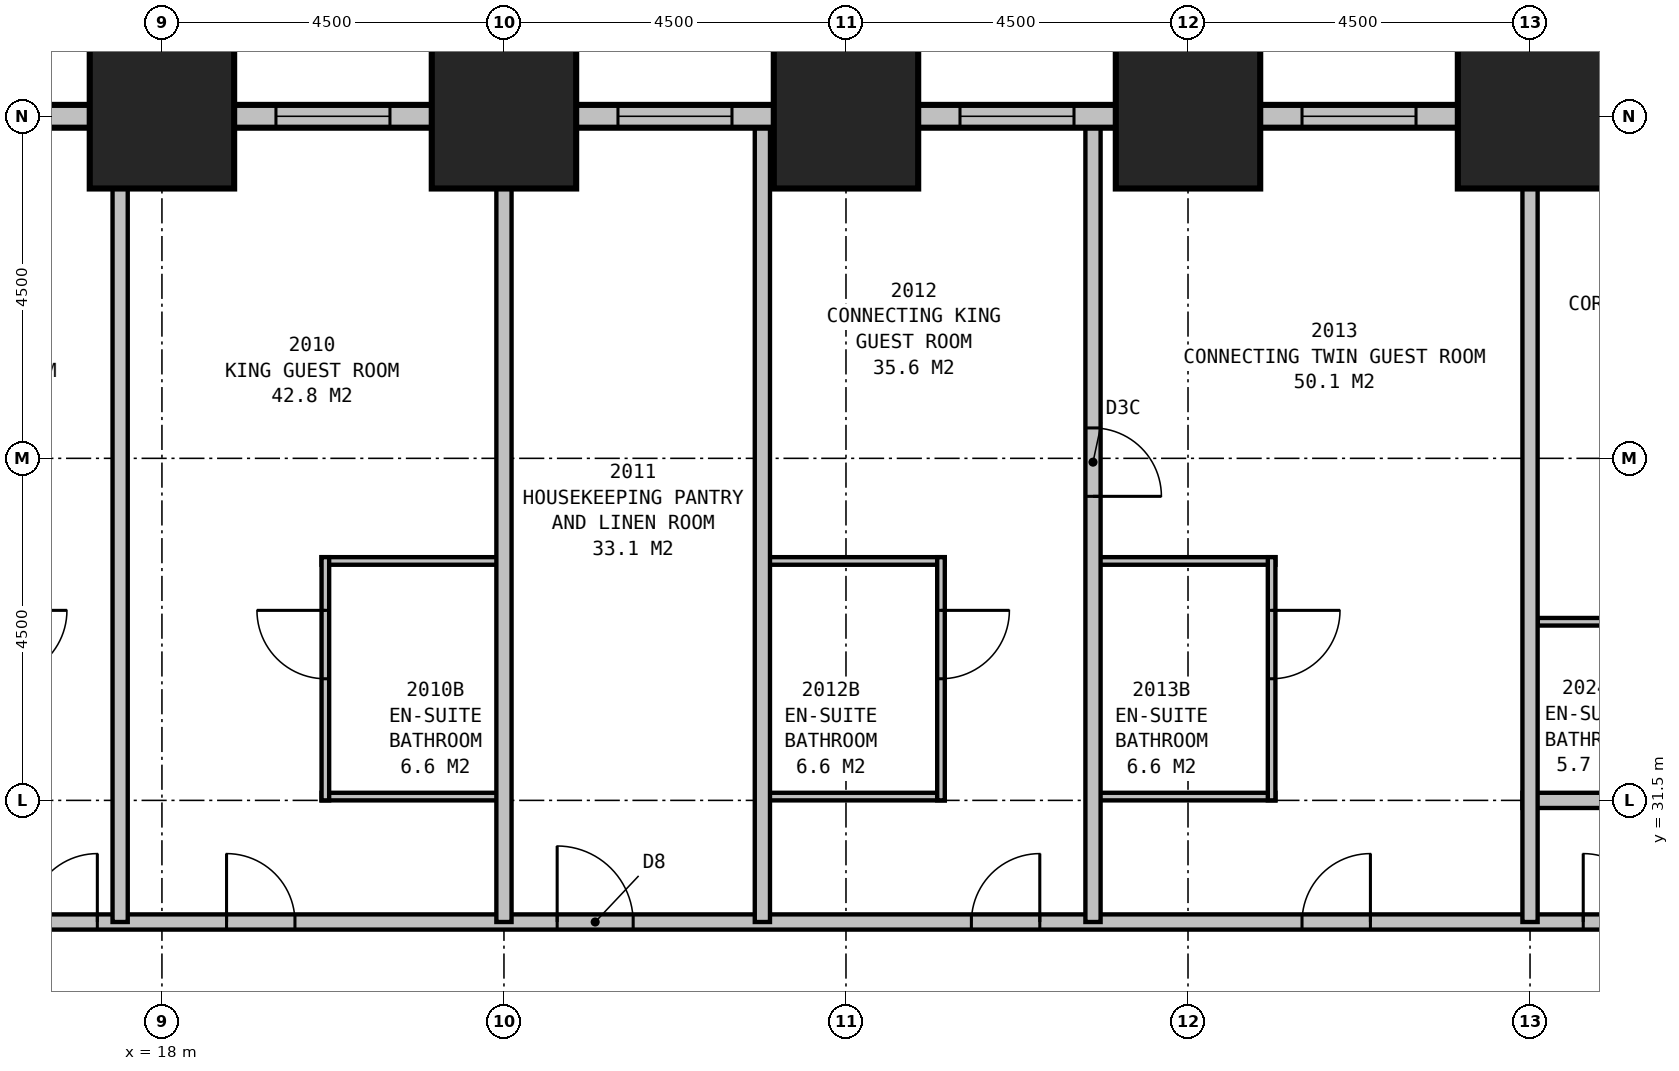
"""IFC4 building model, lengths in metres.
Left out: names, types, materials, properties, quantities, classifications, styles, units other than length and angle.
Written with IfcOpenShell. Run it as: python <this file> out.ifc"""

import sys

from ifc_helpers import new_model, si_unit, direction, frame, frame_2d, origin, origin_2d, place, context, subcontext, project, spatial, rectangle, extrude, element, fill, save


model = new_model("IFC4")
c1 = context("Model", 3, precision=1e-05, world=origin(), true_north=direction((0.0, 1.0)))
c2 = subcontext(c1, "Body", "Model", "MODEL_VIEW")
j1 = project(units=[si_unit("LENGTHUNIT", "METRE"), si_unit("PLANEANGLEUNIT", "RADIAN")], contexts=[c1])
p1 = place(None, origin())
s1 = spatial("IfcSite", under=j1, at=p1, CompositionType="ELEMENT")
p2 = place(p1, origin())
s2 = spatial("IfcBuilding", under=s1, at=p2, CompositionType="ELEMENT")
p3 = place(p2, frame((0.0, 0.0, 82.2)))
s3 = spatial("IfcBuildingStorey", under=s2, at=p3, CompositionType="ELEMENT", Elevation=82.2)
for number, where, z_axis, x_axis in (
    (1, (36.0, 40.5, 0.0), (0.0, 0.0, 1.0), (1.0, 0.0, 0.0)),
    (2, (31.5, 40.5, 0.0), (0.0, 0.0, 1.0), (1.0, 0.0, 0.0)),
    (3, (27.0, 40.5, 0.0), (0.0, 0.0, 1.0), (1.0, 0.0, 0.0)),
    (4, (22.5, 40.5, 0.0), (0.0, 0.0, 1.0), (1.0, 0.0, 0.0)),
    (5, (18.0, 40.5, 0.0), (0.0, 0.0, 1.0), (1.0, 0.0, 0.0)),
):
    element("IfcColumn", number, at=place(p3, frame(where, z_axis=z_axis, x_axis=x_axis)), inside=s3, PredefinedType="COLUMN", context=c2, shape_type="SweptSolid", body=[
        extrude(rectangle(XDim=1.9, YDim=1.9, at=origin_2d()), origin(), (0.0, 0.0, 1.0), 3.5),
    ])
p4 = place(p3, frame((40.65, 40.5, 0.0), z_axis=(0.0, 0.0, 1.0), x_axis=(-1.0, 0.0, 0.0)))
e6 = element("IfcWall", 6, at=p4, inside=s3, PredefinedType="STANDARD", context=c2, shape_type="SweptSolid", body=[
    extrude(rectangle(XDim=31.8, YDim=0.3, at=frame_2d((15.9, 0.0))), origin(), (0.0, 0.0, 1.0), 2.1),
])
p5 = place(p4, frame((1.65, 0.0, 0.5)))
e7 = element("IfcOpeningElement", 7, at=p5, cuts=e6, PredefinedType="OPENING", context=c2, shape_type="SweptSolid", body=[
    extrude(rectangle(XDim=1.5, YDim=1.4, at=frame_2d((0.75, 0.7))), frame((0.0, 0.16, 0.0), z_axis=(0.0, -1.0, 0.0), x_axis=(1.0, 0.0, 0.0)), (0.0, 0.0, 1.0), 0.32),
])
p6 = place(p4, frame((6.15, 0.0, 0.5)))
e8 = element("IfcOpeningElement", 8, at=p6, cuts=e6, PredefinedType="OPENING", context=c2, shape_type="SweptSolid", body=[
    extrude(rectangle(XDim=1.5, YDim=1.4, at=frame_2d((0.75, 0.7))), frame((0.0, 0.16, 0.0), z_axis=(0.0, -1.0, 0.0), x_axis=(1.0, 0.0, 0.0)), (0.0, 0.0, 1.0), 0.32),
])
p7 = place(p4, frame((10.65, 0.0, 0.5)))
e9 = element("IfcOpeningElement", 9, at=p7, cuts=e6, PredefinedType="OPENING", context=c2, shape_type="SweptSolid", body=[
    extrude(rectangle(XDim=1.5, YDim=1.4, at=frame_2d((0.75, 0.7))), frame((0.0, 0.16, 0.0), z_axis=(0.0, -1.0, 0.0), x_axis=(1.0, 0.0, 0.0)), (0.0, 0.0, 1.0), 0.32),
])
p8 = place(p4, frame((15.15, 0.0, 0.5)))
e10 = element("IfcOpeningElement", 10, at=p8, cuts=e6, PredefinedType="OPENING", context=c2, shape_type="SweptSolid", body=[
    extrude(rectangle(XDim=1.5, YDim=1.4, at=frame_2d((0.75, 0.7))), frame((0.0, 0.16, 0.0), z_axis=(0.0, -1.0, 0.0), x_axis=(1.0, 0.0, 0.0)), (0.0, 0.0, 1.0), 0.32),
])
p9 = place(p4, frame((19.65, 0.0, 0.5)))
e11 = element("IfcOpeningElement", 11, at=p9, cuts=e6, PredefinedType="OPENING", context=c2, shape_type="SweptSolid", body=[
    extrude(rectangle(XDim=1.5, YDim=1.4, at=frame_2d((0.75, 0.7))), frame((0.0, 0.16, 0.0), z_axis=(0.0, -1.0, 0.0), x_axis=(1.0, 0.0, 0.0)), (0.0, 0.0, 1.0), 0.32),
])
p10 = place(p4, frame((24.15, 0.0, 0.5)))
e12 = element("IfcOpeningElement", 12, at=p10, cuts=e6, PredefinedType="OPENING", context=c2, shape_type="SweptSolid", body=[
    extrude(rectangle(XDim=1.5, YDim=1.4, at=frame_2d((0.75, 0.7))), frame((0.0, 0.16, 0.0), z_axis=(0.0, -1.0, 0.0), x_axis=(1.0, 0.0, 0.0)), (0.0, 0.0, 1.0), 0.32),
])
p11 = place(p4, frame((28.65, 0.0, 0.5)))
e13 = element("IfcOpeningElement", 13, at=p11, cuts=e6, PredefinedType="OPENING", context=c2, shape_type="SweptSolid", body=[
    extrude(rectangle(XDim=1.5, YDim=1.4, at=frame_2d((0.75, 0.7))), frame((0.0, 0.16, 0.0), z_axis=(0.0, -1.0, 0.0), x_axis=(1.0, 0.0, 0.0)), (0.0, 0.0, 1.0), 0.32),
])
p12 = place(p3, frame((11.2, 29.9, 0.0), z_axis=(0.0, 0.0, 1.0), x_axis=(1.0, 0.0, 0.0)))
e14 = element("IfcWall", 14, at=p12, inside=s3, PredefinedType="PARTITIONING", context=c2, shape_type="SweptSolid", body=[
    extrude(rectangle(XDim=27.1, YDim=0.2, at=frame_2d((13.55, 0.0))), origin(), (0.0, 0.0, 1.0), 3.25),
])
p13 = place(p12, frame((5.05, 0.0, 0.0)))
e15 = element("IfcOpeningElement", 15, at=p13, cuts=e14, PredefinedType="OPENING", context=c2, shape_type="SweptSolid", body=[
    extrude(rectangle(XDim=0.9, YDim=2.1, at=frame_2d((0.45, 1.05))), frame((0.0, 0.11, 0.0), z_axis=(0.0, -1.0, 0.0), x_axis=(1.0, 0.0, 0.0)), (0.0, 0.0, 1.0), 0.22),
])
p14 = place(p12, frame((7.65, 0.0, 0.0)))
e16 = element("IfcOpeningElement", 16, at=p14, cuts=e14, PredefinedType="OPENING", context=c2, shape_type="SweptSolid", body=[
    extrude(rectangle(XDim=0.9, YDim=2.1, at=frame_2d((0.45, 1.05))), frame((0.0, 0.11, 0.0), z_axis=(0.0, -1.0, 0.0), x_axis=(1.0, 0.0, 0.0)), (0.0, 0.0, 1.0), 0.22),
])
p15 = place(p12, frame((12.0, 0.0, 0.0)))
e17 = element("IfcOpeningElement", 17, at=p15, cuts=e14, PredefinedType="OPENING", context=c2, shape_type="SweptSolid", body=[
    extrude(rectangle(XDim=1.0, YDim=2.1, at=frame_2d((0.5, 1.05))), frame((0.0, 0.11, 0.0), z_axis=(0.0, -1.0, 0.0), x_axis=(1.0, 0.0, 0.0)), (0.0, 0.0, 1.0), 0.22),
])
p16 = place(p12, frame((17.45, 0.0, 0.0)))
e18 = element("IfcOpeningElement", 18, at=p16, cuts=e14, PredefinedType="OPENING", context=c2, shape_type="SweptSolid", body=[
    extrude(rectangle(XDim=0.9, YDim=2.1, at=frame_2d((0.45, 1.05))), frame((0.0, 0.11, 0.0), z_axis=(0.0, -1.0, 0.0), x_axis=(1.0, 0.0, 0.0)), (0.0, 0.0, 1.0), 0.22),
])
p17 = place(p12, frame((21.8, 0.0, 0.0)))
e19 = element("IfcOpeningElement", 19, at=p17, cuts=e14, PredefinedType="OPENING", context=c2, shape_type="SweptSolid", body=[
    extrude(rectangle(XDim=0.9, YDim=2.1, at=frame_2d((0.45, 1.05))), frame((0.0, 0.11, 0.0), z_axis=(0.0, -1.0, 0.0), x_axis=(1.0, 0.0, 0.0)), (0.0, 0.0, 1.0), 0.22),
])
p18 = place(p12, frame((25.5, 0.0, 0.0)))
e20 = element("IfcOpeningElement", 20, at=p18, cuts=e14, PredefinedType="OPENING", context=c2, shape_type="SweptSolid", body=[
    extrude(rectangle(XDim=0.9, YDim=2.1, at=frame_2d((0.45, 1.05))), frame((0.0, 0.11, 0.0), z_axis=(0.0, -1.0, 0.0), x_axis=(1.0, 0.0, 0.0)), (0.0, 0.0, 1.0), 0.22),
])
p19 = place(p12, frame((0.7, 0.0, 0.0)))
e21 = element("IfcOpeningElement", 21, at=p19, cuts=e14, PredefinedType="OPENING", context=c2, shape_type="SweptSolid", body=[
    extrude(rectangle(XDim=0.9, YDim=2.1, at=frame_2d((0.45, 1.05))), frame((0.0, 0.11, 0.0), z_axis=(0.0, -1.0, 0.0), x_axis=(1.0, 0.0, 0.0)), (0.0, 0.0, 1.0), 0.22),
])
for number, where, z_axis, x_axis in (
    (22, (17.45, 29.9, 0.0), (0.0, 0.0, 1.0), (0.0, 1.0, 0.0)),
    (23, (22.5, 29.9, 0.0), (0.0, 0.0, 1.0), (0.0, 1.0, 0.0)),
):
    element("IfcWall", number, at=place(p3, frame(where, z_axis=z_axis, x_axis=x_axis)), inside=s3, PredefinedType="PARTITIONING", context=c2, shape_type="SweptSolid", body=[
        extrude(rectangle(XDim=10.6, YDim=0.2, at=frame_2d((5.3, 0.0))), origin(), (0.0, 0.0, 1.0), 2.2),
    ])
p20 = place(p3, frame((25.9, 29.9, 0.0), z_axis=(0.0, 0.0, 1.0), x_axis=(0.0, 1.0, 0.0)))
e24 = element("IfcWall", 24, at=p20, inside=s3, PredefinedType="PARTITIONING", context=c2, shape_type="SweptSolid", body=[
    extrude(rectangle(XDim=10.6, YDim=0.2, at=frame_2d((5.3, 0.0))), origin(), (0.0, 0.0, 1.0), 3.25),
])
p21 = place(p3, frame((30.25, 29.9, 0.0), z_axis=(0.0, 0.0, 1.0), x_axis=(0.0, 1.0, 0.0)))
e25 = element("IfcWall", 25, at=p21, inside=s3, PredefinedType="PARTITIONING", context=c2, shape_type="SweptSolid", body=[
    extrude(rectangle(XDim=10.6, YDim=0.2, at=frame_2d((5.3, 0.0))), origin(), (0.0, 0.0, 1.0), 3.25),
])
p22 = place(p21, frame((6.5, 0.0, 0.0), z_axis=(0.0, 0.0, 1.0), x_axis=(-1.0, 0.0, 0.0)))
e26 = element("IfcOpeningElement", 26, at=p22, cuts=e25, PredefinedType="OPENING", context=c2, shape_type="SweptSolid", body=[
    extrude(rectangle(XDim=0.9, YDim=2.1, at=frame_2d((0.45, 1.05))), frame((0.0, 0.11, 0.0), z_axis=(0.0, -1.0, 0.0), x_axis=(1.0, 0.0, 0.0)), (0.0, 0.0, 1.0), 0.22),
])
for number, where, z_axis, x_axis in (
    (27, (20.1, 31.55, 0.0), (0.0, 0.0, 1.0), (1.0, 0.0, 0.0)),
    (28, (20.1, 34.65, 0.0), (0.0, 0.0, 1.0), (1.0, 0.0, 0.0)),
):
    element("IfcWall", number, at=place(p3, frame(where, z_axis=z_axis, x_axis=x_axis)), inside=s3, PredefinedType="PLUMBINGWALL", context=c2, shape_type="SweptSolid", body=[
        extrude(rectangle(XDim=2.4, YDim=0.1, at=frame_2d((1.2, 0.0))), origin(), (0.0, 0.0, 1.0), 3.25),
    ])
p23 = place(p3, frame((20.15, 31.5, 0.0), z_axis=(0.0, 0.0, 1.0), x_axis=(0.0, 1.0, 0.0)))
e29 = element("IfcWall", 29, at=p23, inside=s3, PredefinedType="PLUMBINGWALL", context=c2, shape_type="SweptSolid", body=[
    extrude(rectangle(XDim=3.2, YDim=0.1, at=frame_2d((1.6, 0.0))), origin(), (0.0, 0.0, 1.0), 3.25),
])
p24 = place(p23, frame((1.6, 0.0, 0.0)))
e30 = element("IfcOpeningElement", 30, at=p24, cuts=e29, PredefinedType="OPENING", context=c2, shape_type="SweptSolid", body=[
    extrude(rectangle(XDim=0.9, YDim=2.1, at=frame_2d((0.45, 1.05))), frame((0.0, 0.06, 0.0), z_axis=(0.0, -1.0, 0.0), x_axis=(1.0, 0.0, 0.0)), (0.0, 0.0, 1.0), 0.12),
])
for number, where, z_axis, x_axis in (
    (31, (25.9, 31.55, 0.0), (0.0, 0.0, 1.0), (1.0, 0.0, 0.0)),
    (32, (25.9, 34.65, 0.0), (0.0, 0.0, 1.0), (1.0, 0.0, 0.0)),
):
    element("IfcWall", number, at=place(p3, frame(where, z_axis=z_axis, x_axis=x_axis)), inside=s3, PredefinedType="PLUMBINGWALL", context=c2, shape_type="SweptSolid", body=[
        extrude(rectangle(XDim=2.4, YDim=0.1, at=frame_2d((1.2, 0.0))), origin(), (0.0, 0.0, 1.0), 3.25),
    ])
p25 = place(p3, frame((28.25, 31.5, 0.0), z_axis=(0.0, 0.0, 1.0), x_axis=(0.0, 1.0, 0.0)))
e33 = element("IfcWall", 33, at=p25, inside=s3, PredefinedType="PLUMBINGWALL", context=c2, shape_type="SweptSolid", body=[
    extrude(rectangle(XDim=3.2, YDim=0.1, at=frame_2d((1.6, 0.0))), origin(), (0.0, 0.0, 1.0), 3.25),
])
p26 = place(p25, frame((2.5, 0.0, 0.0), z_axis=(0.0, 0.0, 1.0), x_axis=(-1.0, 0.0, 0.0)))
e34 = element("IfcOpeningElement", 34, at=p26, cuts=e33, PredefinedType="OPENING", context=c2, shape_type="SweptSolid", body=[
    extrude(rectangle(XDim=0.9, YDim=2.1, at=frame_2d((0.45, 1.05))), frame((0.0, 0.06, 0.0), z_axis=(0.0, -1.0, 0.0), x_axis=(1.0, 0.0, 0.0)), (0.0, 0.0, 1.0), 0.12),
])
for number, where, z_axis, x_axis in (
    (35, (30.25, 31.55, 0.0), (0.0, 0.0, 1.0), (1.0, 0.0, 0.0)),
    (36, (30.25, 34.65, 0.0), (0.0, 0.0, 1.0), (1.0, 0.0, 0.0)),
):
    element("IfcWall", number, at=place(p3, frame(where, z_axis=z_axis, x_axis=x_axis)), inside=s3, PredefinedType="PLUMBINGWALL", context=c2, shape_type="SweptSolid", body=[
        extrude(rectangle(XDim=2.4, YDim=0.1, at=frame_2d((1.2, 0.0))), origin(), (0.0, 0.0, 1.0), 3.25),
    ])
p27 = place(p3, frame((32.6, 31.5, 0.0), z_axis=(0.0, 0.0, 1.0), x_axis=(0.0, 1.0, 0.0)))
e37 = element("IfcWall", 37, at=p27, inside=s3, PredefinedType="PLUMBINGWALL", context=c2, shape_type="SweptSolid", body=[
    extrude(rectangle(XDim=3.2, YDim=0.1, at=frame_2d((1.6, 0.0))), origin(), (0.0, 0.0, 1.0), 3.25),
])
p28 = place(p27, frame((2.5, 0.0, 0.0), z_axis=(0.0, 0.0, 1.0), x_axis=(-1.0, 0.0, 0.0)))
e38 = element("IfcOpeningElement", 38, at=p28, cuts=e37, PredefinedType="OPENING", context=c2, shape_type="SweptSolid", body=[
    extrude(rectangle(XDim=0.9, YDim=2.1, at=frame_2d((0.45, 1.05))), frame((0.0, 0.06, 0.0), z_axis=(0.0, -1.0, 0.0), x_axis=(1.0, 0.0, 0.0)), (0.0, 0.0, 1.0), 0.12),
])
p29 = place(p3, frame((36.0, 29.9, 0.0), z_axis=(0.0, 0.0, 1.0), x_axis=(0.0, 1.0, 0.0)))
e39 = element("IfcWall", 39, at=p29, inside=s3, PredefinedType="PARTITIONING", context=c2, shape_type="SweptSolid", body=[
    extrude(rectangle(XDim=10.6, YDim=0.2, at=frame_2d((5.3, 0.0))), origin(), (0.0, 0.0, 1.0), 2.2),
])
p30 = place(p3, frame((35.9, 31.5, 0.0), z_axis=(0.0, 0.0, 1.0), x_axis=(1.0, 0.0, 0.0)))
e40 = element("IfcWall", 40, at=p30, inside=s3, PredefinedType="PARTITIONING", context=c2, shape_type="SweptSolid", body=[
    extrude(rectangle(XDim=10.099, YDim=0.2, at=frame_2d((5.05, 0.0))), origin(), (0.0, 0.0, 1.0), 3.25),
])
p31 = place(p30, frame((8.099, 0.0, 0.0)))
e41 = element("IfcOpeningElement", 41, at=p31, cuts=e40, PredefinedType="OPENING", context=c2, shape_type="SweptSolid", body=[
    extrude(rectangle(XDim=0.9, YDim=2.1, at=frame_2d((0.45, 1.05))), frame((0.0, 0.11, 0.0), z_axis=(0.0, -1.0, 0.0), x_axis=(1.0, 0.0, 0.0)), (0.0, 0.0, 1.0), 0.22),
])
p32 = place(p3, frame((36.1, 33.85, 0.0), z_axis=(0.0, 0.0, 1.0), x_axis=(1.0, 0.0, 0.0)))
e42 = element("IfcWall", 42, at=p32, inside=s3, PredefinedType="PLUMBINGWALL", context=c2, shape_type="SweptSolid", body=[
    extrude(rectangle(XDim=2.7, YDim=0.1, at=frame_2d((1.35, 0.0))), origin(), (0.0, 0.0, 1.0), 3.25),
])
p33 = place(p32, frame((0.9, 0.0, 0.0)))
e43 = element("IfcOpeningElement", 43, at=p33, cuts=e42, PredefinedType="OPENING", context=c2, shape_type="SweptSolid", body=[
    extrude(rectangle(XDim=0.9, YDim=2.1, at=frame_2d((0.45, 1.05))), frame((0.0, 0.06, 0.0), z_axis=(0.0, -1.0, 0.0), x_axis=(1.0, 0.0, 0.0)), (0.0, 0.0, 1.0), 0.12),
])
p34 = place(p6, origin())
e44 = element("IfcWindow", 44, at=p34, inside=s3, PartitioningType="SINGLE_PANEL", PredefinedType="WINDOW", context=c2, shape_type="SweptSolid", body=[
    extrude(rectangle(XDim=1.5, YDim=1.4, at=frame_2d((0.75, 0.7))), frame((0.0, 0.03, 0.0), z_axis=(0.0, -1.0, 0.0), x_axis=(1.0, 0.0, 0.0)), (0.0, 0.0, 1.0), 0.06),
])
fill(e8, e44)
p35 = place(p7, origin())
e45 = element("IfcWindow", 45, at=p35, inside=s3, PartitioningType="SINGLE_PANEL", PredefinedType="WINDOW", context=c2, shape_type="SweptSolid", body=[
    extrude(rectangle(XDim=1.5, YDim=1.4, at=frame_2d((0.75, 0.7))), frame((0.0, 0.03, 0.0), z_axis=(0.0, -1.0, 0.0), x_axis=(1.0, 0.0, 0.0)), (0.0, 0.0, 1.0), 0.06),
])
fill(e9, e45)
p36 = place(p8, origin())
e46 = element("IfcWindow", 46, at=p36, inside=s3, PartitioningType="SINGLE_PANEL", PredefinedType="WINDOW", context=c2, shape_type="SweptSolid", body=[
    extrude(rectangle(XDim=1.5, YDim=1.4, at=frame_2d((0.75, 0.7))), frame((0.0, 0.03, 0.0), z_axis=(0.0, -1.0, 0.0), x_axis=(1.0, 0.0, 0.0)), (0.0, 0.0, 1.0), 0.06),
])
fill(e10, e46)
p37 = place(p9, origin())
e47 = element("IfcWindow", 47, at=p37, inside=s3, PartitioningType="SINGLE_PANEL", PredefinedType="WINDOW", context=c2, shape_type="SweptSolid", body=[
    extrude(rectangle(XDim=1.5, YDim=1.4, at=frame_2d((0.75, 0.7))), frame((0.0, 0.03, 0.0), z_axis=(0.0, -1.0, 0.0), x_axis=(1.0, 0.0, 0.0)), (0.0, 0.0, 1.0), 0.06),
])
fill(e11, e47)
p38 = place(p13, origin())
e48 = element("IfcDoor", 48, at=p38, inside=s3, OperationType="SINGLE_SWING_RIGHT", PredefinedType="DOOR", context=c2, shape_type="SweptSolid", body=[
    extrude(rectangle(XDim=0.9, YDim=2.1, at=frame_2d((0.45, 1.05))), frame((0.0, 0.025, 0.0), z_axis=(0.0, -1.0, 0.0), x_axis=(1.0, 0.0, 0.0)), (0.0, 0.0, 1.0), 0.05),
])
fill(e15, e48)
p39 = place(p14, origin())
e49 = element("IfcDoor", 49, at=p39, inside=s3, OperationType="SINGLE_SWING_LEFT", PredefinedType="DOOR", context=c2, shape_type="SweptSolid", body=[
    extrude(rectangle(XDim=0.9, YDim=2.1, at=frame_2d((0.45, 1.05))), frame((0.0, 0.025, 0.0), z_axis=(0.0, -1.0, 0.0), x_axis=(1.0, 0.0, 0.0)), (0.0, 0.0, 1.0), 0.05),
])
fill(e16, e49)
p40 = place(p15, origin())
e50 = element("IfcDoor", 50, at=p40, inside=s3, OperationType="SINGLE_SWING_LEFT", PredefinedType="DOOR", context=c2, shape_type="SweptSolid", body=[
    extrude(rectangle(XDim=1.0, YDim=2.1, at=frame_2d((0.5, 1.05))), frame((0.0, 0.025, 0.0), z_axis=(0.0, -1.0, 0.0), x_axis=(1.0, 0.0, 0.0)), (0.0, 0.0, 1.0), 0.05),
])
fill(e17, e50)
p41 = place(p16, origin())
e51 = element("IfcDoor", 51, at=p41, inside=s3, OperationType="SINGLE_SWING_RIGHT", PredefinedType="DOOR", context=c2, shape_type="SweptSolid", body=[
    extrude(rectangle(XDim=0.9, YDim=2.1, at=frame_2d((0.45, 1.05))), frame((0.0, 0.025, 0.0), z_axis=(0.0, -1.0, 0.0), x_axis=(1.0, 0.0, 0.0)), (0.0, 0.0, 1.0), 0.05),
])
fill(e18, e51)
p42 = place(p17, origin())
e52 = element("IfcDoor", 52, at=p42, inside=s3, OperationType="SINGLE_SWING_RIGHT", PredefinedType="DOOR", context=c2, shape_type="SweptSolid", body=[
    extrude(rectangle(XDim=0.9, YDim=2.1, at=frame_2d((0.45, 1.05))), frame((0.0, 0.025, 0.0), z_axis=(0.0, -1.0, 0.0), x_axis=(1.0, 0.0, 0.0)), (0.0, 0.0, 1.0), 0.05),
])
fill(e19, e52)
p43 = place(p18, origin())
e53 = element("IfcDoor", 53, at=p43, inside=s3, OperationType="SINGLE_SWING_LEFT", PredefinedType="DOOR", context=c2, shape_type="SweptSolid", body=[
    extrude(rectangle(XDim=0.9, YDim=2.1, at=frame_2d((0.45, 1.05))), frame((0.0, 0.025, 0.0), z_axis=(0.0, -1.0, 0.0), x_axis=(1.0, 0.0, 0.0)), (0.0, 0.0, 1.0), 0.05),
])
fill(e20, e53)
p44 = place(p22, origin())
e54 = element("IfcDoor", 54, at=p44, inside=s3, OperationType="SINGLE_SWING_RIGHT", PredefinedType="DOOR", context=c2, shape_type="SweptSolid", body=[
    extrude(rectangle(XDim=0.9, YDim=2.1, at=frame_2d((0.45, 1.05))), frame((0.0, 0.025, 0.0), z_axis=(0.0, -1.0, 0.0), x_axis=(1.0, 0.0, 0.0)), (0.0, 0.0, 1.0), 0.05),
])
fill(e26, e54)
p45 = place(p24, origin())
e55 = element("IfcDoor", 55, at=p45, inside=s3, OperationType="SINGLE_SWING_RIGHT", PredefinedType="DOOR", context=c2, shape_type="SweptSolid", body=[
    extrude(rectangle(XDim=0.9, YDim=2.1, at=frame_2d((0.45, 1.05))), frame((0.0, 0.025, 0.0), z_axis=(0.0, -1.0, 0.0), x_axis=(1.0, 0.0, 0.0)), (0.0, 0.0, 1.0), 0.05),
])
fill(e30, e55)
p46 = place(p26, origin())
e56 = element("IfcDoor", 56, at=p46, inside=s3, OperationType="SINGLE_SWING_LEFT", PredefinedType="DOOR", context=c2, shape_type="SweptSolid", body=[
    extrude(rectangle(XDim=0.9, YDim=2.1, at=frame_2d((0.45, 1.05))), frame((0.0, 0.025, 0.0), z_axis=(0.0, -1.0, 0.0), x_axis=(1.0, 0.0, 0.0)), (0.0, 0.0, 1.0), 0.05),
])
fill(e34, e56)
p47 = place(p28, origin())
e57 = element("IfcDoor", 57, at=p47, inside=s3, OperationType="SINGLE_SWING_LEFT", PredefinedType="DOOR", context=c2, shape_type="SweptSolid", body=[
    extrude(rectangle(XDim=0.9, YDim=2.1, at=frame_2d((0.45, 1.05))), frame((0.0, 0.025, 0.0), z_axis=(0.0, -1.0, 0.0), x_axis=(1.0, 0.0, 0.0)), (0.0, 0.0, 1.0), 0.05),
])
fill(e38, e57)
save(model, sys.argv[1])
